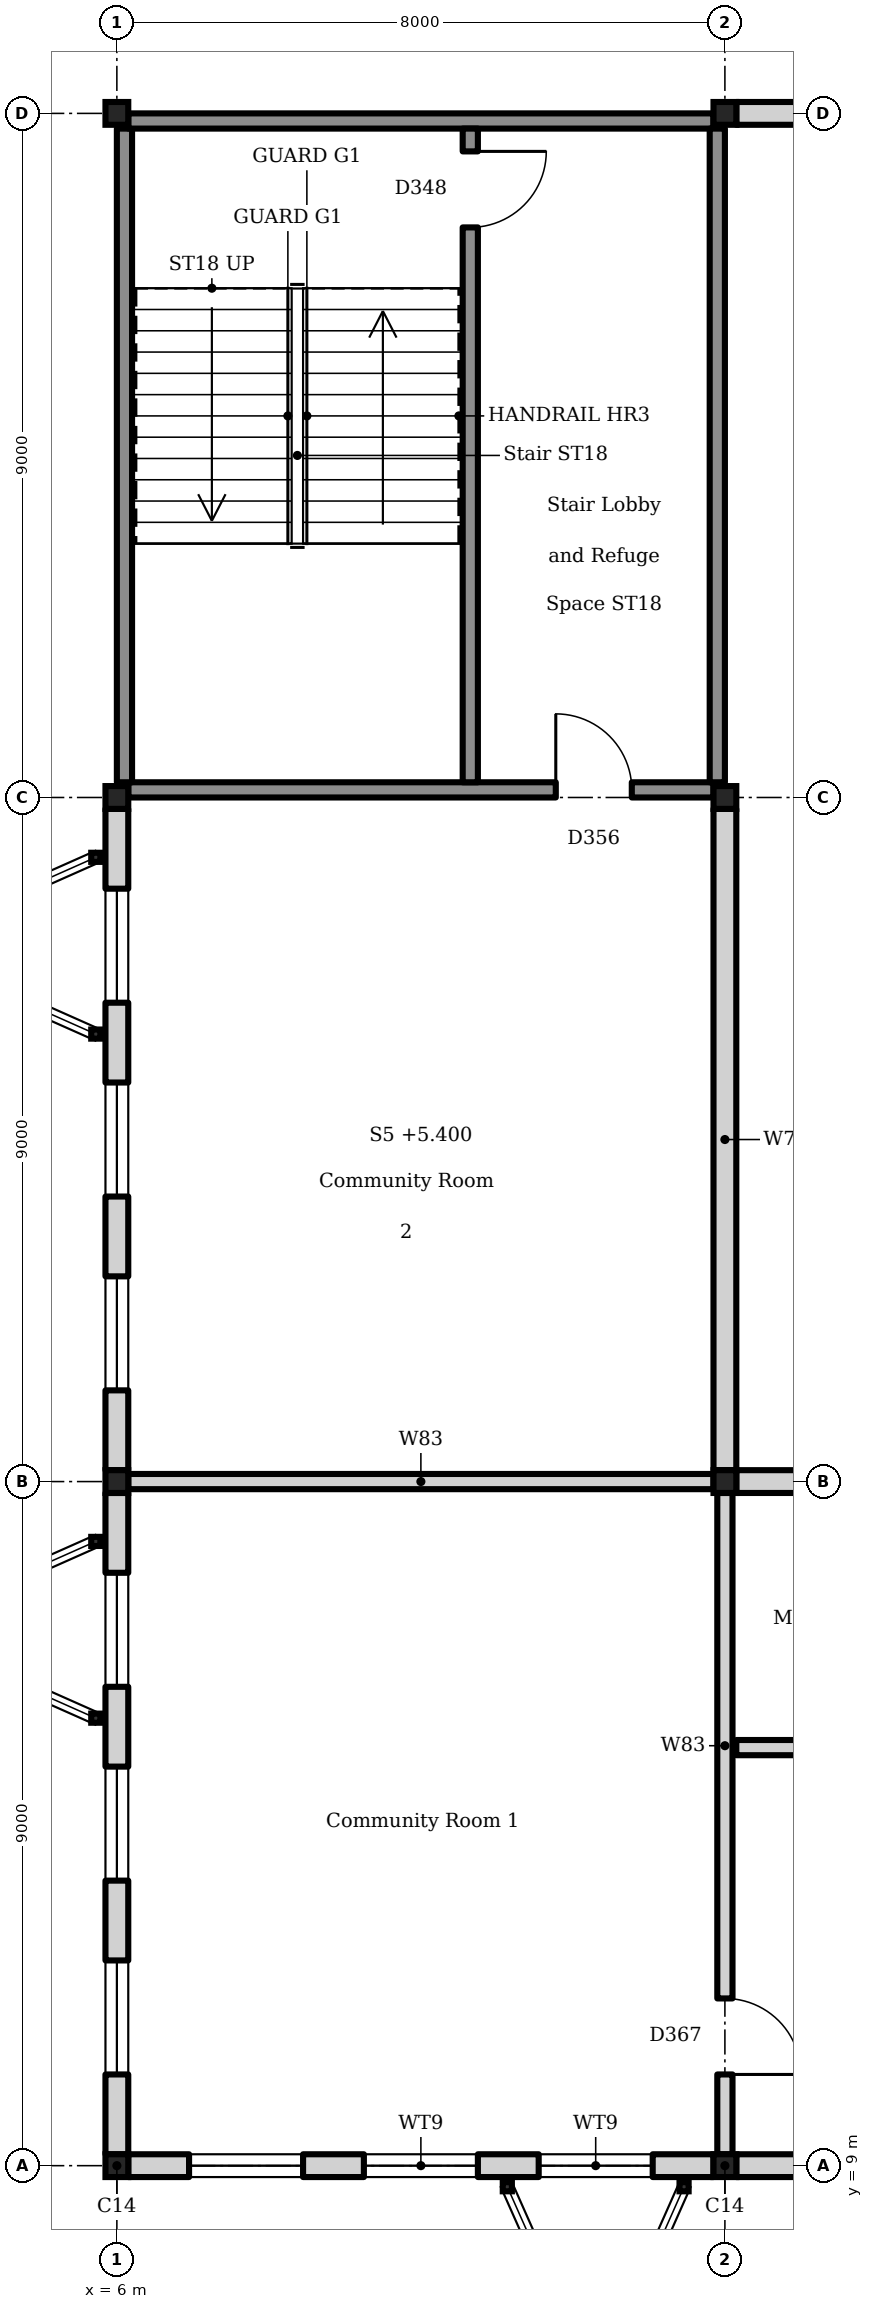
"""IFC4 building model, lengths in metres.
Left out: names, types, materials, properties, quantities, classifications, styles, units other than length and angle.
Written with IfcOpenShell. Run it as: python <this file> out.ifc"""

import sys

from ifc_helpers import new_model, si_unit, direction, frame, frame_2d, origin, origin_2d, place, context, subcontext, project, spatial, rectangle, i_section, extrude, element, fill, save


model = new_model("IFC4")
c1 = context("Model", 3, precision=1e-05, world=origin(), true_north=direction((0.0, 1.0)))
c2 = subcontext(c1, "Body", "Model", "MODEL_VIEW")
j1 = project(units=[si_unit("LENGTHUNIT", "METRE"), si_unit("PLANEANGLEUNIT", "RADIAN")], contexts=[c1])
p1 = place(None, origin())
s1 = spatial("IfcSite", under=j1, at=p1, CompositionType="ELEMENT")
p2 = place(p1, origin())
s2 = spatial("IfcBuilding", under=s1, at=p2, CompositionType="ELEMENT")
p3 = place(p2, frame((0.0, 0.0, 5.4)))
s3 = spatial("IfcBuildingStorey", under=s2, at=p3, CompositionType="ELEMENT", Elevation=5.4)
for number, where, z_axis, x_axis in (
    (1, (6.0, 9.0, 0.0), (0.0, 0.0, 1.0), (1.0, 0.0, 0.0)),
    (2, (6.0, 18.0, 0.0), (0.0, 0.0, 1.0), (1.0, 0.0, 0.0)),
    (3, (6.0, 27.0, 0.0), (0.0, 0.0, 1.0), (1.0, 0.0, 0.0)),
    (4, (6.0, 36.0, 0.0), (0.0, 0.0, 1.0), (1.0, 0.0, 0.0)),
    (5, (14.0, 9.0, 0.0), (0.0, 0.0, 1.0), (1.0, 0.0, 0.0)),
    (6, (14.0, 18.0, 0.0), (0.0, 0.0, 1.0), (1.0, 0.0, 0.0)),
    (7, (14.0, 27.0, 0.0), (0.0, 0.0, 1.0), (1.0, 0.0, 0.0)),
    (8, (14.0, 36.0, 0.0), (0.0, 0.0, 1.0), (1.0, 0.0, 0.0)),
):
    element("IfcColumn", number, at=place(p3, frame(where, z_axis=z_axis, x_axis=x_axis)), inside=s3, PredefinedType="COLUMN", context=c2, shape_type="SweptSolid", body=[
        extrude(i_section(OverallWidth=0.3, OverallDepth=0.3, WebThickness=0.011, FlangeThickness=0.019, FilletRadius=0.027, at=origin_2d()), origin(), (0.0, 0.0, 1.0), 4.5),
    ])
p4 = place(p3, frame((6.15, 9.0, 0.0), z_axis=(0.0, 0.0, 1.0), x_axis=(1.0, 0.0, 0.0)))
e9 = element("IfcWall", 9, at=p4, inside=s3, PredefinedType="SOLIDWALL", context=c2, shape_type="SweptSolid", body=[
    extrude(rectangle(XDim=7.7, YDim=0.3, at=frame_2d((3.85, 0.0))), origin(), (0.0, 0.0, 1.0), 3.82),
])
p5 = place(p4, frame((0.8, 0.0, 0.9)))
e10 = element("IfcOpeningElement", 10, at=p5, cuts=e9, PredefinedType="OPENING", context=c2, shape_type="SweptSolid", body=[
    extrude(rectangle(XDim=1.5, YDim=2.8, at=frame_2d((0.75, 1.4))), frame((0.0, 0.16, 0.0), z_axis=(0.0, -1.0, 0.0), x_axis=(1.0, 0.0, 0.0)), (0.0, 0.0, 1.0), 0.32),
])
p6 = place(p4, frame((3.1, 0.0, 0.9)))
e11 = element("IfcOpeningElement", 11, at=p6, cuts=e9, PredefinedType="OPENING", context=c2, shape_type="SweptSolid", body=[
    extrude(rectangle(XDim=1.5, YDim=2.8, at=frame_2d((0.75, 1.4))), frame((0.0, 0.16, 0.0), z_axis=(0.0, -1.0, 0.0), x_axis=(1.0, 0.0, 0.0)), (0.0, 0.0, 1.0), 0.32),
])
p7 = place(p4, frame((5.4, 0.0, 0.9)))
e12 = element("IfcOpeningElement", 12, at=p7, cuts=e9, PredefinedType="OPENING", context=c2, shape_type="SweptSolid", body=[
    extrude(rectangle(XDim=1.5, YDim=2.8, at=frame_2d((0.75, 1.4))), frame((0.0, 0.16, 0.0), z_axis=(0.0, -1.0, 0.0), x_axis=(1.0, 0.0, 0.0)), (0.0, 0.0, 1.0), 0.32),
])
p8 = place(p3, frame((14.15, 9.0, 0.0), z_axis=(0.0, 0.0, 1.0), x_axis=(1.0, 0.0, 0.0)))
e13 = element("IfcWall", 13, at=p8, inside=s3, PredefinedType="SOLIDWALL", context=c2, shape_type="SweptSolid", body=[
    extrude(rectangle(XDim=7.7, YDim=0.3, at=frame_2d((3.85, 0.0))), origin(), (0.0, 0.0, 1.0), 3.82),
])
p9 = place(p8, frame((0.8, 0.0, 0.9)))
e14 = element("IfcOpeningElement", 14, at=p9, cuts=e13, PredefinedType="OPENING", context=c2, shape_type="SweptSolid", body=[
    extrude(rectangle(XDim=1.5, YDim=2.8, at=frame_2d((0.75, 1.4))), frame((0.0, 0.16, 0.0), z_axis=(0.0, -1.0, 0.0), x_axis=(1.0, 0.0, 0.0)), (0.0, 0.0, 1.0), 0.32),
])
p10 = place(p8, frame((3.1, 0.0, 0.9)))
e15 = element("IfcOpeningElement", 15, at=p10, cuts=e13, PredefinedType="OPENING", context=c2, shape_type="SweptSolid", body=[
    extrude(rectangle(XDim=1.5, YDim=2.8, at=frame_2d((0.75, 1.4))), frame((0.0, 0.16, 0.0), z_axis=(0.0, -1.0, 0.0), x_axis=(1.0, 0.0, 0.0)), (0.0, 0.0, 1.0), 0.32),
])
p11 = place(p3, frame((6.0, 9.15, 0.0), z_axis=(0.0, 0.0, 1.0), x_axis=(0.0, 1.0, 0.0)))
e16 = element("IfcWall", 16, at=p11, inside=s3, PredefinedType="SOLIDWALL", context=c2, shape_type="SweptSolid", body=[
    extrude(rectangle(XDim=8.7, YDim=0.3, at=frame_2d((4.35, 0.0))), origin(), (0.0, 0.0, 1.0), 3.82),
])
p12 = place(p11, frame((1.05, 0.0, 0.9)))
e17 = element("IfcOpeningElement", 17, at=p12, cuts=e16, PredefinedType="OPENING", context=c2, shape_type="SweptSolid", body=[
    extrude(rectangle(XDim=1.5, YDim=2.8, at=frame_2d((0.75, 1.4))), frame((0.0, 0.16, 0.0), z_axis=(0.0, -1.0, 0.0), x_axis=(1.0, 0.0, 0.0)), (0.0, 0.0, 1.0), 0.32),
])
p13 = place(p11, frame((3.6, 0.0, 0.9)))
e18 = element("IfcOpeningElement", 18, at=p13, cuts=e16, PredefinedType="OPENING", context=c2, shape_type="SweptSolid", body=[
    extrude(rectangle(XDim=1.5, YDim=2.8, at=frame_2d((0.75, 1.4))), frame((0.0, 0.16, 0.0), z_axis=(0.0, -1.0, 0.0), x_axis=(1.0, 0.0, 0.0)), (0.0, 0.0, 1.0), 0.32),
])
p14 = place(p11, frame((6.15, 0.0, 0.9)))
e19 = element("IfcOpeningElement", 19, at=p14, cuts=e16, PredefinedType="OPENING", context=c2, shape_type="SweptSolid", body=[
    extrude(rectangle(XDim=1.5, YDim=2.8, at=frame_2d((0.75, 1.4))), frame((0.0, 0.16, 0.0), z_axis=(0.0, -1.0, 0.0), x_axis=(1.0, 0.0, 0.0)), (0.0, 0.0, 1.0), 0.32),
])
p15 = place(p3, frame((6.0, 18.15, 0.0), z_axis=(0.0, 0.0, 1.0), x_axis=(0.0, 1.0, 0.0)))
e20 = element("IfcWall", 20, at=p15, inside=s3, PredefinedType="SOLIDWALL", context=c2, shape_type="SweptSolid", body=[
    extrude(rectangle(XDim=8.7, YDim=0.3, at=frame_2d((4.35, 0.0))), origin(), (0.0, 0.0, 1.0), 3.82),
])
p16 = place(p15, frame((1.05, 0.0, 0.9)))
e21 = element("IfcOpeningElement", 21, at=p16, cuts=e20, PredefinedType="OPENING", context=c2, shape_type="SweptSolid", body=[
    extrude(rectangle(XDim=1.5, YDim=2.8, at=frame_2d((0.75, 1.4))), frame((0.0, 0.16, 0.0), z_axis=(0.0, -1.0, 0.0), x_axis=(1.0, 0.0, 0.0)), (0.0, 0.0, 1.0), 0.32),
])
p17 = place(p15, frame((3.6, 0.0, 0.9)))
e22 = element("IfcOpeningElement", 22, at=p17, cuts=e20, PredefinedType="OPENING", context=c2, shape_type="SweptSolid", body=[
    extrude(rectangle(XDim=1.5, YDim=2.8, at=frame_2d((0.75, 1.4))), frame((0.0, 0.16, 0.0), z_axis=(0.0, -1.0, 0.0), x_axis=(1.0, 0.0, 0.0)), (0.0, 0.0, 1.0), 0.32),
])
p18 = place(p15, frame((6.15, 0.0, 0.9)))
e23 = element("IfcOpeningElement", 23, at=p18, cuts=e20, PredefinedType="OPENING", context=c2, shape_type="SweptSolid", body=[
    extrude(rectangle(XDim=1.5, YDim=2.8, at=frame_2d((0.75, 1.4))), frame((0.0, 0.16, 0.0), z_axis=(0.0, -1.0, 0.0), x_axis=(1.0, 0.0, 0.0)), (0.0, 0.0, 1.0), 0.32),
])
p19 = place(p3, frame((14.15, 36.0, 0.0), z_axis=(0.0, 0.0, 1.0), x_axis=(1.0, 0.0, 0.0)))
e24 = element("IfcWall", 24, at=p19, inside=s3, PredefinedType="SOLIDWALL", context=c2, shape_type="SweptSolid", body=[
    extrude(rectangle(XDim=7.7, YDim=0.3, at=frame_2d((3.85, 0.0))), origin(), (0.0, 0.0, 1.0), 3.72),
])
p20 = place(p19, frame((0.8, 0.0, 1.4)))
e25 = element("IfcOpeningElement", 25, at=p20, cuts=e24, PredefinedType="OPENING", context=c2, shape_type="SweptSolid", body=[
    extrude(rectangle(XDim=1.5, YDim=2.0, at=frame_2d((0.75, 1.0))), frame((0.0, 0.16, 0.0), z_axis=(0.0, -1.0, 0.0), x_axis=(1.0, 0.0, 0.0)), (0.0, 0.0, 1.0), 0.32),
])
p21 = place(p19, frame((3.1, 0.0, 1.4)))
e26 = element("IfcOpeningElement", 26, at=p21, cuts=e24, PredefinedType="OPENING", context=c2, shape_type="SweptSolid", body=[
    extrude(rectangle(XDim=1.5, YDim=2.0, at=frame_2d((0.75, 1.0))), frame((0.0, 0.16, 0.0), z_axis=(0.0, -1.0, 0.0), x_axis=(1.0, 0.0, 0.0)), (0.0, 0.0, 1.0), 0.32),
])
p22 = place(p19, frame((5.4, 0.0, 1.4)))
e27 = element("IfcOpeningElement", 27, at=p22, cuts=e24, PredefinedType="OPENING", context=c2, shape_type="SweptSolid", body=[
    extrude(rectangle(XDim=1.5, YDim=2.0, at=frame_2d((0.75, 1.0))), frame((0.0, 0.16, 0.0), z_axis=(0.0, -1.0, 0.0), x_axis=(1.0, 0.0, 0.0)), (0.0, 0.0, 1.0), 0.32),
])
p23 = place(p3, frame((14.0, 18.15, 0.0), z_axis=(0.0, 0.0, 1.0), x_axis=(0.0, 1.0, 0.0)))
e28 = element("IfcWall", 28, at=p23, inside=s3, PredefinedType="SOLIDWALL", context=c2, shape_type="SweptSolid", body=[
    extrude(rectangle(XDim=8.7, YDim=0.3, at=frame_2d((4.35, 0.0))), origin(), (0.0, 0.0, 1.0), 3.72),
])
p24 = place(p3, frame((14.15, 18.0, 0.0), z_axis=(0.0, 0.0, 1.0), x_axis=(1.0, 0.0, 0.0)))
e29 = element("IfcWall", 29, at=p24, inside=s3, PredefinedType="SOLIDWALL", context=c2, shape_type="SweptSolid", body=[
    extrude(rectangle(XDim=7.7, YDim=0.3, at=frame_2d((3.85, 0.0))), origin(), (0.0, 0.0, 1.0), 3.72),
])
p25 = place(p3, frame((6.15, 27.1, 0.0), z_axis=(0.0, 0.0, 1.0), x_axis=(1.0, 0.0, 0.0)))
e30 = element("IfcWall", 30, at=p25, inside=s3, PredefinedType="SOLIDWALL", context=c2, shape_type="SweptSolid", body=[
    extrude(rectangle(XDim=7.7, YDim=0.2, at=frame_2d((3.85, 0.0))), origin(), (0.0, 0.0, 1.0), 4.3),
])
p26 = place(p25, frame((5.625, 0.0, 0.0)))
e31 = element("IfcOpeningElement", 31, at=p26, cuts=e30, PredefinedType="OPENING", context=c2, shape_type="SweptSolid", body=[
    extrude(rectangle(XDim=1.0, YDim=2.1, at=frame_2d((0.5, 1.05))), frame((0.0, 0.11, 0.0), z_axis=(0.0, -1.0, 0.0), x_axis=(1.0, 0.0, 0.0)), (0.0, 0.0, 1.0), 0.22),
])
p27 = place(p3, frame((6.1, 27.2, 0.0), z_axis=(0.0, 0.0, 1.0), x_axis=(0.0, 1.0, 0.0)))
e32 = element("IfcWall", 32, at=p27, inside=s3, PredefinedType="SOLIDWALL", context=c2, shape_type="SweptSolid", body=[
    extrude(rectangle(XDim=8.6, YDim=0.2, at=frame_2d((4.3, 0.0))), origin(), (0.0, 0.0, 1.0), 4.3),
])
p28 = place(p3, frame((6.15, 35.9, 0.0), z_axis=(0.0, 0.0, 1.0), x_axis=(1.0, 0.0, 0.0)))
e33 = element("IfcWall", 33, at=p28, inside=s3, PredefinedType="SOLIDWALL", context=c2, shape_type="SweptSolid", body=[
    extrude(rectangle(XDim=7.7, YDim=0.2, at=frame_2d((3.85, 0.0))), origin(), (0.0, 0.0, 1.0), 4.3),
])
p29 = place(p3, frame((13.9, 27.2, 0.0), z_axis=(0.0, 0.0, 1.0), x_axis=(0.0, 1.0, 0.0)))
e34 = element("IfcWall", 34, at=p29, inside=s3, PredefinedType="SOLIDWALL", context=c2, shape_type="SweptSolid", body=[
    extrude(rectangle(XDim=8.6, YDim=0.2, at=frame_2d((4.3, 0.0))), origin(), (0.0, 0.0, 1.0), 4.3),
])
p30 = place(p3, frame((10.65, 27.2, 0.0), z_axis=(0.0, 0.0, 1.0), x_axis=(0.0, 1.0, 0.0)))
e35 = element("IfcWall", 35, at=p30, inside=s3, PredefinedType="SOLIDWALL", context=c2, shape_type="SweptSolid", body=[
    extrude(rectangle(XDim=8.6, YDim=0.2, at=frame_2d((4.3, 0.0))), origin(), (0.0, 0.0, 1.0), 4.3),
])
p31 = place(p30, frame((7.3, 0.0, 0.0)))
e36 = element("IfcOpeningElement", 36, at=p31, cuts=e35, PredefinedType="OPENING", context=c2, shape_type="SweptSolid", body=[
    extrude(rectangle(XDim=1.0, YDim=2.1, at=frame_2d((0.5, 1.05))), frame((0.0, 0.11, 0.0), z_axis=(0.0, -1.0, 0.0), x_axis=(1.0, 0.0, 0.0)), (0.0, 0.0, 1.0), 0.22),
])
p32 = place(p3, frame((6.15, 18.0, 0.0), z_axis=(0.0, 0.0, 1.0), x_axis=(1.0, 0.0, 0.0)))
e37 = element("IfcWall", 37, at=p32, inside=s3, PredefinedType="PARTITIONING", context=c2, shape_type="SweptSolid", body=[
    extrude(rectangle(XDim=7.7, YDim=0.2, at=frame_2d((3.85, 0.0))), origin(), (0.0, 0.0, 1.0), 3.82),
])
p33 = place(p3, frame((14.0, 9.15, 0.0), z_axis=(0.0, 0.0, 1.0), x_axis=(0.0, 1.0, 0.0)))
e38 = element("IfcWall", 38, at=p33, inside=s3, PredefinedType="PARTITIONING", context=c2, shape_type="SweptSolid", body=[
    extrude(rectangle(XDim=8.7, YDim=0.2, at=frame_2d((4.35, 0.0))), origin(), (0.0, 0.0, 1.0), 3.82),
])
p34 = place(p33, frame((1.05, 0.0, 0.0)))
e39 = element("IfcOpeningElement", 39, at=p34, cuts=e38, PredefinedType="OPENING", context=c2, shape_type="SweptSolid", body=[
    extrude(rectangle(XDim=1.0, YDim=2.1, at=frame_2d((0.5, 1.05))), frame((0.0, 0.11, 0.0), z_axis=(0.0, -1.0, 0.0), x_axis=(1.0, 0.0, 0.0)), (0.0, 0.0, 1.0), 0.22),
])
p35 = place(p3, frame((14.15, 14.5, 0.0), z_axis=(0.0, 0.0, 1.0), x_axis=(1.0, 0.0, 0.0)))
e40 = element("IfcWall", 40, at=p35, inside=s3, PredefinedType="PARTITIONING", context=c2, shape_type="SweptSolid", body=[
    extrude(rectangle(XDim=7.85, YDim=0.2, at=frame_2d((3.925, 0.0))), origin(), (0.0, 0.0, 1.0), 4.3),
])
p36 = place(p35, frame((3.35, 0.0, 0.0)))
e41 = element("IfcOpeningElement", 41, at=p36, cuts=e40, PredefinedType="OPENING", context=c2, shape_type="SweptSolid", body=[
    extrude(rectangle(XDim=1.0, YDim=2.1, at=frame_2d((0.5, 1.05))), frame((0.0, 0.11, 0.0), z_axis=(0.0, -1.0, 0.0), x_axis=(1.0, 0.0, 0.0)), (0.0, 0.0, 1.0), 0.22),
])
p37 = place(p5, origin())
e42 = element("IfcWindow", 42, at=p37, inside=s3, PartitioningType="SINGLE_PANEL", PredefinedType="WINDOW", context=c2, shape_type="SweptSolid", body=[
    extrude(rectangle(XDim=1.5, YDim=2.8, at=frame_2d((0.75, 1.4))), frame((0.0, 0.03, 0.0), z_axis=(0.0, -1.0, 0.0), x_axis=(1.0, 0.0, 0.0)), (0.0, 0.0, 1.0), 0.06),
])
fill(e10, e42)
p38 = place(p6, origin())
e43 = element("IfcWindow", 43, at=p38, inside=s3, PartitioningType="SINGLE_PANEL", PredefinedType="WINDOW", context=c2, shape_type="SweptSolid", body=[
    extrude(rectangle(XDim=1.5, YDim=2.8, at=frame_2d((0.75, 1.4))), frame((0.0, 0.03, 0.0), z_axis=(0.0, -1.0, 0.0), x_axis=(1.0, 0.0, 0.0)), (0.0, 0.0, 1.0), 0.06),
])
fill(e11, e43)
p39 = place(p7, origin())
e44 = element("IfcWindow", 44, at=p39, inside=s3, PartitioningType="SINGLE_PANEL", PredefinedType="WINDOW", context=c2, shape_type="SweptSolid", body=[
    extrude(rectangle(XDim=1.5, YDim=2.8, at=frame_2d((0.75, 1.4))), frame((0.0, 0.03, 0.0), z_axis=(0.0, -1.0, 0.0), x_axis=(1.0, 0.0, 0.0)), (0.0, 0.0, 1.0), 0.06),
])
fill(e12, e44)
p40 = place(p12, origin())
e45 = element("IfcWindow", 45, at=p40, inside=s3, PartitioningType="SINGLE_PANEL", PredefinedType="WINDOW", context=c2, shape_type="SweptSolid", body=[
    extrude(rectangle(XDim=1.5, YDim=2.8, at=frame_2d((0.75, 1.4))), frame((0.0, 0.03, 0.0), z_axis=(0.0, -1.0, 0.0), x_axis=(1.0, 0.0, 0.0)), (0.0, 0.0, 1.0), 0.06),
])
fill(e17, e45)
p41 = place(p13, origin())
e46 = element("IfcWindow", 46, at=p41, inside=s3, PartitioningType="SINGLE_PANEL", PredefinedType="WINDOW", context=c2, shape_type="SweptSolid", body=[
    extrude(rectangle(XDim=1.5, YDim=2.8, at=frame_2d((0.75, 1.4))), frame((0.0, 0.03, 0.0), z_axis=(0.0, -1.0, 0.0), x_axis=(1.0, 0.0, 0.0)), (0.0, 0.0, 1.0), 0.06),
])
fill(e18, e46)
p42 = place(p14, origin())
e47 = element("IfcWindow", 47, at=p42, inside=s3, PartitioningType="SINGLE_PANEL", PredefinedType="WINDOW", context=c2, shape_type="SweptSolid", body=[
    extrude(rectangle(XDim=1.5, YDim=2.8, at=frame_2d((0.75, 1.4))), frame((0.0, 0.03, 0.0), z_axis=(0.0, -1.0, 0.0), x_axis=(1.0, 0.0, 0.0)), (0.0, 0.0, 1.0), 0.06),
])
fill(e19, e47)
p43 = place(p16, origin())
e48 = element("IfcWindow", 48, at=p43, inside=s3, PartitioningType="SINGLE_PANEL", PredefinedType="WINDOW", context=c2, shape_type="SweptSolid", body=[
    extrude(rectangle(XDim=1.5, YDim=2.8, at=frame_2d((0.75, 1.4))), frame((0.0, 0.03, 0.0), z_axis=(0.0, -1.0, 0.0), x_axis=(1.0, 0.0, 0.0)), (0.0, 0.0, 1.0), 0.06),
])
fill(e21, e48)
p44 = place(p17, origin())
e49 = element("IfcWindow", 49, at=p44, inside=s3, PartitioningType="SINGLE_PANEL", PredefinedType="WINDOW", context=c2, shape_type="SweptSolid", body=[
    extrude(rectangle(XDim=1.5, YDim=2.8, at=frame_2d((0.75, 1.4))), frame((0.0, 0.03, 0.0), z_axis=(0.0, -1.0, 0.0), x_axis=(1.0, 0.0, 0.0)), (0.0, 0.0, 1.0), 0.06),
])
fill(e22, e49)
p45 = place(p18, origin())
e50 = element("IfcWindow", 50, at=p45, inside=s3, PartitioningType="SINGLE_PANEL", PredefinedType="WINDOW", context=c2, shape_type="SweptSolid", body=[
    extrude(rectangle(XDim=1.5, YDim=2.8, at=frame_2d((0.75, 1.4))), frame((0.0, 0.03, 0.0), z_axis=(0.0, -1.0, 0.0), x_axis=(1.0, 0.0, 0.0)), (0.0, 0.0, 1.0), 0.06),
])
fill(e23, e50)
p46 = place(p31, frame((1.0, 0.0, 0.0), z_axis=(0.0, 0.0, 1.0), x_axis=(-1.0, 0.0, 0.0)))
e51 = element("IfcDoor", 51, at=p46, inside=s3, OperationType="SINGLE_SWING_RIGHT", PredefinedType="DOOR", context=c2, shape_type="SweptSolid", body=[
    extrude(rectangle(XDim=1.0, YDim=2.1, at=frame_2d((0.5, 1.05))), frame((0.0, 0.025, 0.0), z_axis=(0.0, -1.0, 0.0), x_axis=(1.0, 0.0, 0.0)), (0.0, 0.0, 1.0), 0.05),
])
fill(e36, e51)
p47 = place(p26, origin())
e52 = element("IfcDoor", 52, at=p47, inside=s3, OperationType="SINGLE_SWING_RIGHT", PredefinedType="DOOR", context=c2, shape_type="SweptSolid", body=[
    extrude(rectangle(XDim=1.0, YDim=2.1, at=frame_2d((0.5, 1.05))), frame((0.0, 0.025, 0.0), z_axis=(0.0, -1.0, 0.0), x_axis=(1.0, 0.0, 0.0)), (0.0, 0.0, 1.0), 0.05),
])
fill(e31, e52)
p48 = place(p34, frame((1.0, 0.0, 0.0), z_axis=(0.0, 0.0, 1.0), x_axis=(-1.0, 0.0, 0.0)))
e53 = element("IfcDoor", 53, at=p48, inside=s3, OperationType="SINGLE_SWING_LEFT", PredefinedType="DOOR", context=c2, shape_type="SweptSolid", body=[
    extrude(rectangle(XDim=1.0, YDim=2.1, at=frame_2d((0.5, 1.05))), frame((0.0, 0.025, 0.0), z_axis=(0.0, -1.0, 0.0), x_axis=(1.0, 0.0, 0.0)), (0.0, 0.0, 1.0), 0.05),
])
fill(e39, e53)
save(model, sys.argv[1])
